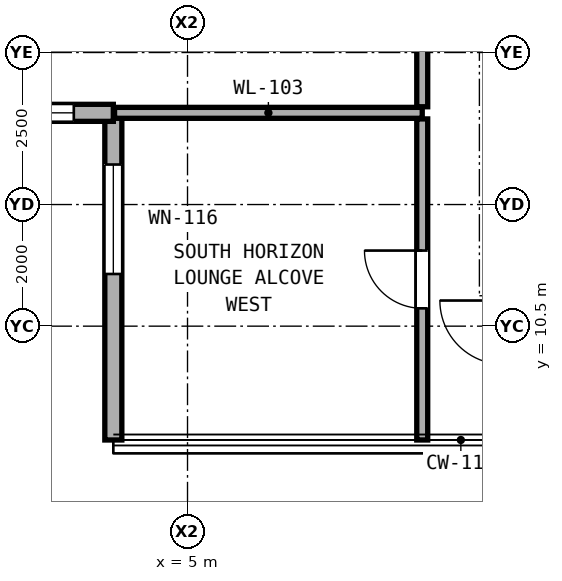
"""IFC4 building model, lengths in metres.
Left out: names, types, materials, properties, quantities, classifications, styles, units other than length and angle.
Written with IfcOpenShell. Run it as: python <this file> out.ifc"""

import sys

from ifc_helpers import new_model, si_unit, direction, frame, frame_2d, origin, place, context, subcontext, project, spatial, rectangle, extrude, element, fill, save


model = new_model("IFC4")
c1 = context("Model", 3, precision=1e-05, world=origin(), true_north=direction((0.0, 1.0)))
c2 = subcontext(c1, "Body", "Model", "MODEL_VIEW")
j1 = project(units=[si_unit("LENGTHUNIT", "METRE"), si_unit("PLANEANGLEUNIT", "RADIAN")], contexts=[c1])
p1 = place(None, origin())
s1 = spatial("IfcSite", under=j1, at=p1, CompositionType="ELEMENT")
p2 = place(p1, origin())
s2 = spatial("IfcBuilding", under=s1, at=p2, CompositionType="ELEMENT")
p3 = place(p2, frame((0.0, 0.0, 35.6)))
s3 = spatial("IfcBuildingStorey", under=s2, at=p3, CompositionType="ELEMENT", Elevation=35.6)
p4 = place(p3, frame((3.78, 14.008, 0.0), z_axis=(0.0, 0.0, 1.0), x_axis=(0.0, -1.0, 0.0)))
e1 = element("IfcWall", 1, at=p4, inside=s3, PredefinedType="SOLIDWALL", context=c2, shape_type="SweptSolid", body=[
    extrude(rectangle(XDim=5.38, YDim=0.28, at=frame_2d((2.69, 0.0))), origin(), (0.0, 0.0, 1.0), 3.04),
])
p5 = place(p4, frame((0.85, 0.0, 0.79)))
e2 = element("IfcOpeningElement", 2, at=p5, cuts=e1, PredefinedType="OPENING", context=c2, shape_type="SweptSolid", body=[
    extrude(rectangle(XDim=1.8, YDim=2.1, at=frame_2d((0.9, 1.05))), frame((0.0, 0.15, 0.0), z_axis=(0.0, -1.0, 0.0), x_axis=(1.0, 0.0, 0.0)), (0.0, 0.0, 1.0), 0.3),
])
p6 = place(p3, frame((-1.6, 14.008, 0.0), z_axis=(0.0, 0.0, 1.0), x_axis=(1.0, 0.0, 0.0)))
e3 = element("IfcWall", 3, at=p6, inside=s3, PredefinedType="SOLIDWALL", context=c2, shape_type="SweptSolid", body=[
    extrude(rectangle(XDim=5.38, YDim=0.28, at=frame_2d((2.69, 0.0))), origin(), (0.0, 0.0, 1.0), 3.04),
])
p7 = place(p6, frame((3.63, 0.0, 0.85)))
e4 = element("IfcOpeningElement", 4, at=p7, cuts=e3, PredefinedType="OPENING", context=c2, shape_type="SweptSolid", body=[
    extrude(rectangle(XDim=1.1, YDim=2.0, at=frame_2d((0.55, 1.0))), frame((0.0, 0.15, 0.0), z_axis=(0.0, -1.0, 0.0), x_axis=(1.0, 0.0, 0.0)), (0.0, 0.0, 1.0), 0.3),
])
p8 = place(p3, frame((3.8, 14.008, 0.0), z_axis=(0.0, 0.0, 1.0), x_axis=(1.0, 0.0, 0.0)))
e5 = element("IfcWall", 5, at=p8, inside=s3, PredefinedType="PARTITIONING", context=c2, shape_type="SweptSolid", body=[
    extrude(rectangle(XDim=5.06, YDim=0.18, at=frame_2d((2.53, 0.0))), origin(), (0.0, 0.0, 1.0), 3.06),
])
p9 = place(p3, frame((8.86, 8.628, 0.0), z_axis=(0.0, 0.0, 1.0), x_axis=(0.0, 1.0, 0.0)))
e6 = element("IfcWall", 6, at=p9, inside=s3, PredefinedType="PARTITIONING", context=c2, shape_type="SweptSolid", body=[
    extrude(rectangle(XDim=5.28, YDim=0.18, at=frame_2d((2.64, 0.0))), origin(), (0.0, 0.0, 1.0), 3.06),
])
p10 = place(p9, frame((2.165, 0.0, 0.0)))
e7 = element("IfcOpeningElement", 7, at=p10, cuts=e6, PredefinedType="OPENING", context=c2, shape_type="SweptSolid", body=[
    extrude(rectangle(XDim=0.95, YDim=2.15, at=frame_2d((0.475, 1.075))), frame((0.0, 0.1, 0.0), z_axis=(0.0, -1.0, 0.0), x_axis=(1.0, 0.0, 0.0)), (0.0, 0.0, 1.0), 0.2),
])
p11 = place(p3, frame((8.86, 14.108, 0.0), z_axis=(0.0, 0.0, 1.0), x_axis=(0.0, 1.0, 0.0)))
e8 = element("IfcWall", 8, at=p11, inside=s3, PredefinedType="PARTITIONING", context=c2, shape_type="SweptSolid", body=[
    extrude(rectangle(XDim=8.292, YDim=0.18, at=frame_2d((4.146, 0.0))), origin(), (0.0, 0.0, 1.0), 2.436),
])
p12 = place(p11, frame((3.621, 0.0, 0.0)))
e9 = element("IfcOpeningElement", 9, at=p12, cuts=e8, PredefinedType="OPENING", context=c2, shape_type="SweptSolid", body=[
    extrude(rectangle(XDim=1.05, YDim=2.2, at=frame_2d((0.525, 1.1))), frame((0.0, 0.1, 0.0), z_axis=(0.0, -1.0, 0.0), x_axis=(1.0, 0.0, 0.0)), (0.0, 0.0, 1.0), 0.2),
])
p13 = place(p5, origin())
e10 = element("IfcWindow", 10, at=p13, inside=s3, PartitioningType="SINGLE_PANEL", PredefinedType="WINDOW", context=c2, shape_type="SweptSolid", body=[
    extrude(rectangle(XDim=1.8, YDim=2.1, at=frame_2d((0.9, 1.05))), frame((0.0, 0.03, 0.0), z_axis=(0.0, -1.0, 0.0), x_axis=(1.0, 0.0, 0.0)), (0.0, 0.0, 1.0), 0.06),
])
fill(e2, e10)
p14 = place(p7, origin())
e11 = element("IfcWindow", 11, at=p14, inside=s3, PartitioningType="SINGLE_PANEL", PredefinedType="WINDOW", context=c2, shape_type="SweptSolid", body=[
    extrude(rectangle(XDim=1.1, YDim=2.0, at=frame_2d((0.55, 1.0))), frame((0.0, 0.03, 0.0), z_axis=(0.0, -1.0, 0.0), x_axis=(1.0, 0.0, 0.0)), (0.0, 0.0, 1.0), 0.06),
])
fill(e4, e11)
p15 = place(p10, origin())
e12 = element("IfcDoor", 12, at=p15, inside=s3, OperationType="SINGLE_SWING_RIGHT", PredefinedType="DOOR", context=c2, shape_type="SweptSolid", body=[
    extrude(rectangle(XDim=0.95, YDim=2.15, at=frame_2d((0.475, 1.075))), frame((0.0, 0.025, 0.0), z_axis=(0.0, -1.0, 0.0), x_axis=(1.0, 0.0, 0.0)), (0.0, 0.0, 1.0), 0.05),
])
fill(e7, e12)
save(model, sys.argv[1])
